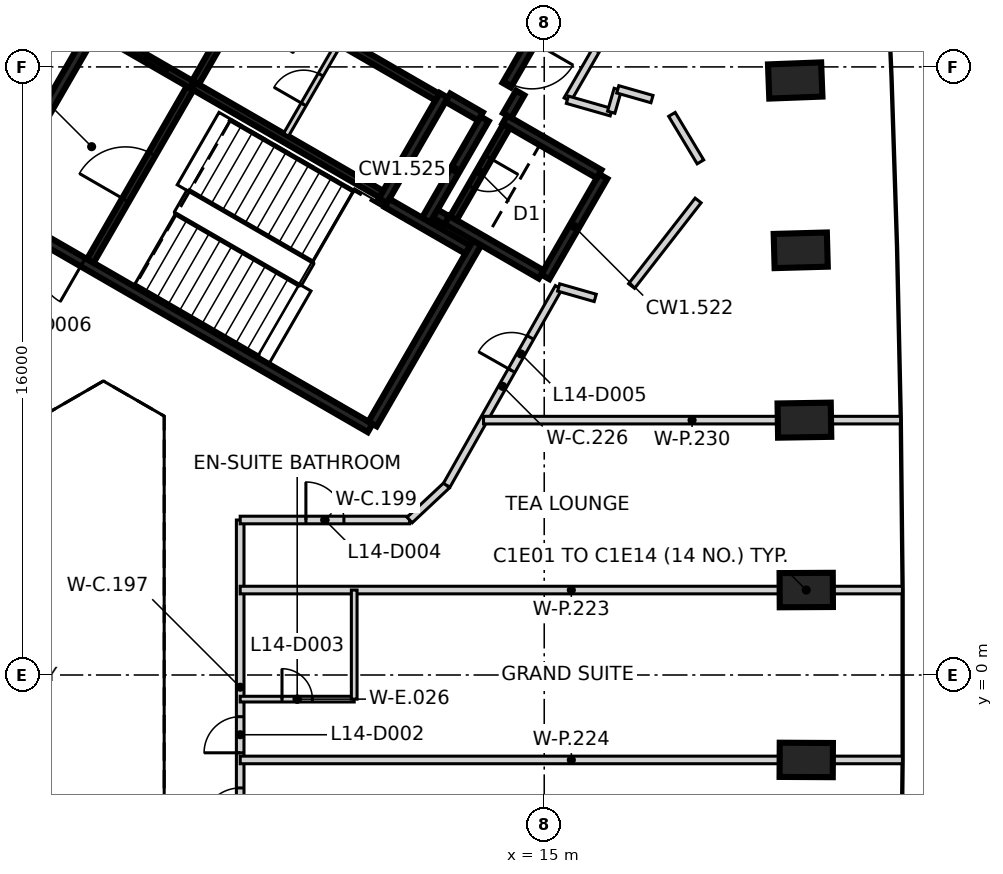
"""IFC4 building model, lengths in metres.
Left out: names, types, materials, properties, quantities, classifications, styles, units other than length and angle.
Written with IfcOpenShell. Run it as: python <this file> out.ifc"""

import sys

from ifc_helpers import new_model, si_unit, direction, frame, frame_2d, origin, origin_2d, place, context, subcontext, project, spatial, rectangle, extrude, element, fill, save


model = new_model("IFC4")
c1 = context("Model", 3, precision=1e-05, world=origin(), true_north=direction((0.0, 1.0)))
c2 = subcontext(c1, "Body", "Model", "MODEL_VIEW")
j1 = project(units=[si_unit("LENGTHUNIT", "METRE"), si_unit("PLANEANGLEUNIT", "RADIAN")], contexts=[c1])
p1 = place(None, origin())
s1 = spatial("IfcSite", under=j1, at=p1, CompositionType="ELEMENT")
p2 = place(p1, origin())
s2 = spatial("IfcBuilding", under=s1, at=p2, CompositionType="ELEMENT")
p3 = place(p2, frame((0.0, 0.0, 63.8)))
s3 = spatial("IfcBuildingStorey", under=s2, at=p3, CompositionType="ELEMENT", Elevation=63.8)
for number, where, z_axis, x_axis in (
    (1, (21.894, -2.235, -0.475), (0.0, 0.0, 1.0), (-1.0, 0.005, 0.0)),
    (2, (21.894, 2.235, -0.475), (0.0, 0.0, 1.0), (1.0, 0.005, 0.0)),
    (3, (21.846, 6.706, -0.475), (0.0, 0.0, 1.0), (1.0, 0.016, 0.0)),
    (4, (21.749, 11.174, -0.475), (0.0, 0.0, 1.0), (1.0, 0.027, 0.0)),
    (5, (21.604, 15.643, -0.475), (0.0, 0.0, 1.0), (0.999, 0.038, 0.0)),
):
    element("IfcColumn", number, at=place(p3, frame(where, z_axis=z_axis, x_axis=x_axis)), inside=s3, PredefinedType="COLUMN", context=c2, shape_type="SweptSolid", body=[
        extrude(rectangle(XDim=1.4, YDim=0.9, at=origin_2d()), origin(), (0.0, 0.0, 1.0), 3.6),
    ])
p4 = place(p3, frame((10.42, 6.498, 0.0), z_axis=(0.0, 0.0, 1.0), x_axis=(-0.866021906294, 0.500006057782, 0.0)))
e6 = element("IfcWall", 6, at=p4, inside=s3, PredefinedType="SHEAR", context=c2, shape_type="SweptSolid", body=[
    extrude(rectangle(XDim=11.55, YDim=0.25, at=frame_2d((5.775, 0.0))), origin(), (0.0, 0.0, 1.0), 3.125),
])
p5 = place(p4, frame((10.025, 0.0, 0.0)))
e7 = element("IfcOpeningElement", 7, at=p5, cuts=e6, PredefinedType="OPENING", context=c2, shape_type="SweptSolid", body=[
    extrude(rectangle(XDim=1.2, YDim=2.1, at=frame_2d((0.6, 1.05))), frame((0.0, 0.135, 0.0), z_axis=(0.0, -1.0, 0.0), x_axis=(1.0, 0.0, 0.0)), (0.0, 0.0, 1.0), 0.27),
])
p6 = place(p4, frame((8.725, 0.0, 0.0)))
e8 = element("IfcOpeningElement", 8, at=p6, cuts=e6, PredefinedType="OPENING", context=c2, shape_type="SweptSolid", body=[
    extrude(rectangle(XDim=1.2, YDim=2.1, at=frame_2d((0.6, 1.05))), frame((0.0, 0.135, 0.0), z_axis=(0.0, -1.0, 0.0), x_axis=(1.0, 0.0, 0.0)), (0.0, 0.0, 1.0), 0.27),
])
p7 = place(p3, frame((0.48, 12.381, 0.0), z_axis=(0.0, 0.0, 1.0), x_axis=(0.49999885962, 0.866026062182, 0.0)))
e9 = element("IfcWall", 9, at=p7, inside=s3, PredefinedType="SHEAR", context=c2, shape_type="SweptSolid", body=[
    extrude(rectangle(XDim=5.225, YDim=0.25, at=frame_2d((2.612, 0.0))), origin(), (0.0, 0.0, 1.0), 3.125),
])
p8 = place(p3, frame((13.238, 11.378, 0.0), z_axis=(0.0, 0.0, 1.0), x_axis=(-0.500008851346, -0.866020293397, 0.0)))
e10 = element("IfcWall", 10, at=p8, inside=s3, PredefinedType="SHEAR", context=c2, shape_type="SweptSolid", body=[
    extrude(rectangle(XDim=5.51, YDim=0.25, at=frame_2d((2.755, 0.0))), origin(), (0.0, 0.0, 1.0), 3.125),
])
p9 = place(p3, frame((12.357, 15.252, 0.0), z_axis=(0.0, 0.0, 1.0), x_axis=(-0.500028443584, -0.866008981251, 0.0)))
e11 = element("IfcWall", 11, at=p9, inside=s3, PredefinedType="SHEAR", context=c2, shape_type="SweptSolid", body=[
    extrude(rectangle(XDim=3.2, YDim=0.25, at=frame_2d((1.6, 0.0))), origin(), (0.0, 0.0, 1.0), 3.125),
])
p10 = place(p3, frame((16.552, 13.119, 0.0), z_axis=(0.0, 0.0, 1.0), x_axis=(-0.499978833458, -0.866037623948, 0.0)))
e12 = element("IfcWall", 12, at=p10, inside=s3, PredefinedType="SHEAR", context=c2, shape_type="SweptSolid", body=[
    extrude(rectangle(XDim=3.05, YDim=0.25, at=frame_2d((1.525, 0.0))), origin(), (0.0, 0.0, 1.0), 3.125),
])
p11 = place(p3, frame((14.918, 10.54, 0.0), z_axis=(0.0, 0.0, 1.0), x_axis=(-0.866063538972, 0.499933942099, 0.0)))
e13 = element("IfcWall", 13, at=p11, inside=s3, PredefinedType="SHEAR", context=c2, shape_type="SweptSolid", body=[
    extrude(rectangle(XDim=2.865, YDim=0.25, at=frame_2d((1.432, 0.0))), origin(), (0.0, 0.0, 1.0), 3.125),
])
p12 = place(p3, frame((13.963, 14.614, 0.0), z_axis=(0.0, 0.0, 1.0), x_axis=(0.866042235819, -0.499970844928, 0.0)))
e14 = element("IfcWall", 14, at=p12, inside=s3, PredefinedType="SHEAR", context=c2, shape_type="SweptSolid", body=[
    extrude(rectangle(XDim=2.865, YDim=0.25, at=frame_2d((1.432, 0.0))), origin(), (0.0, 0.0, 1.0), 3.125),
])
p13 = place(p3, frame((11.888, 11.961, 0.0), z_axis=(0.0, 0.0, 1.0), x_axis=(0.500003324108, 0.866023484601, 0.0)))
e15 = element("IfcWall", 15, at=p13, inside=s3, PredefinedType="SHEAR", context=c2, shape_type="SweptSolid", body=[
    extrude(rectangle(XDim=3.085, YDim=0.25, at=frame_2d((1.542, 0.0))), origin(), (0.0, 0.0, 1.0), 3.125),
])
p14 = place(p3, frame((10.865, 12.418, 0.0), z_axis=(0.0, 0.0, 1.0), x_axis=(0.866026229868, -0.499998569178, 0.0)))
e16 = element("IfcWall", 16, at=p14, inside=s3, PredefinedType="SHEAR", context=c2, shape_type="SweptSolid", body=[
    extrude(rectangle(XDim=2.449, YDim=0.25, at=frame_2d((1.225, 0.0))), origin(), (0.0, 0.0, 1.0), 3.125),
])
p15 = place(p3, frame((14.945, 17.135, 0.0), z_axis=(0.0, 0.0, 1.0), x_axis=(-0.499983108224, -0.866035156036, 0.0)))
e17 = element("IfcWall", 17, at=p15, inside=s3, PredefinedType="SHEAR", context=c2, shape_type="SweptSolid", body=[
    extrude(rectangle(XDim=1.865, YDim=0.25, at=frame_2d((0.932, 0.0))), origin(), (0.0, 0.0, 1.0), 3.125),
])
p16 = place(p15, frame((0.535, 0.0, 0.0)))
e18 = element("IfcOpeningElement", 18, at=p16, cuts=e17, PredefinedType="OPENING", context=c2, shape_type="SweptSolid", body=[
    extrude(rectangle(XDim=1.25, YDim=2.1, at=frame_2d((0.625, 1.05))), frame((0.0, 0.135, 0.0), z_axis=(0.0, -1.0, 0.0), x_axis=(1.0, 0.0, 0.0)), (0.0, 0.0, 1.0), 0.27),
])
p17 = place(p3, frame((13.322, 14.695, 0.0), z_axis=(0.0, 0.0, 1.0), x_axis=(-0.866017078145, 0.500014420154, 0.0)))
e19 = element("IfcWall", 19, at=p17, inside=s3, PredefinedType="SHEAR", context=c2, shape_type="SweptSolid", body=[
    extrude(rectangle(XDim=0.989, YDim=0.25, at=frame_2d((0.495, 0.0))), origin(), (0.0, 0.0, 1.0), 3.125),
])
p18 = place(p3, frame((14.368, 15.315, 0.0), z_axis=(0.0, 0.0, 1.0), x_axis=(-0.499897359611, -0.866084655132, 0.0)))
e20 = element("IfcWall", 20, at=p18, inside=s3, PredefinedType="SHEAR", context=c2, shape_type="SweptSolid", body=[
    extrude(rectangle(XDim=0.685, YDim=0.25, at=frame_2d((0.342, 0.0))), origin(), (0.0, 0.0, 1.0), 3.125),
])
p19 = place(p3, frame((12.433, 11.964, 0.0), z_axis=(0.0, 0.0, 1.0), x_axis=(-0.866055875208, 0.499947218231, 0.0)))
e21 = element("IfcWall", 21, at=p19, inside=s3, PredefinedType="SHEAR", context=c2, shape_type="SweptSolid", body=[
    extrude(rectangle(XDim=0.345, YDim=0.25, at=frame_2d((0.172, 0.0))), origin(), (0.0, 0.0, 1.0), 3.125),
])
p20 = place(p3, frame((5.775, 15.502, 0.0), z_axis=(0.0, 0.0, 1.0), x_axis=(0.866020080793, -0.500009219579, 0.0)))
e22 = element("IfcWall", 22, at=p20, inside=s3, PredefinedType="SHEAR", context=c2, shape_type="SweptSolid", body=[
    extrude(rectangle(XDim=5.699, YDim=0.2, at=frame_2d((2.85, 0.0))), origin(), (0.0, 0.0, 1.0), 3.125),
])
p21 = place(p3, frame((12.185, 15.207, 0.0), z_axis=(0.0, 0.0, 1.0), x_axis=(-0.866020080793, 0.500009219579, 0.0)))
e23 = element("IfcWall", 23, at=p21, inside=s3, PredefinedType="SHEAR", context=c2, shape_type="SweptSolid", body=[
    extrude(rectangle(XDim=5.699, YDim=0.2, at=frame_2d((2.85, 0.0))), origin(), (0.0, 0.0, 1.0), 3.125),
])
p22 = place(p21, frame((3.874, 0.0, 0.0)))
e24 = element("IfcOpeningElement", 24, at=p22, cuts=e23, PredefinedType="OPENING", context=c2, shape_type="SweptSolid", body=[
    extrude(rectangle(XDim=0.9, YDim=2.1, at=frame_2d((0.45, 1.05))), frame((0.0, 0.11, 0.0), z_axis=(0.0, -1.0, 0.0), x_axis=(1.0, 0.0, 0.0)), (0.0, 0.0, 1.0), 0.22),
])
p23 = place(p3, frame((3.057, 10.895, 0.0), z_axis=(0.0, 0.0, 1.0), x_axis=(0.499989418164, 0.866031513124, 0.0)))
e25 = element("IfcWall", 25, at=p23, inside=s3, PredefinedType="SHEAR", context=c2, shape_type="SweptSolid", body=[
    extrude(rectangle(XDim=5.251, YDim=0.2, at=frame_2d((2.625, 0.0))), origin(), (0.0, 0.0, 1.0), 3.125),
])
p24 = place(p23, frame((1.849, 0.0, 0.0)))
e26 = element("IfcOpeningElement", 26, at=p24, cuts=e25, PredefinedType="OPENING", context=c2, shape_type="SweptSolid", body=[
    extrude(rectangle(XDim=1.4, YDim=2.1, at=frame_2d((0.7, 1.05))), frame((0.0, 0.11, 0.0), z_axis=(0.0, -1.0, 0.0), x_axis=(1.0, 0.0, 0.0)), (0.0, 0.0, 1.0), 0.22),
])
p25 = place(p3, frame((14.008, 14.442, 0.0), z_axis=(0.0, 0.0, 1.0), x_axis=(-0.499986818241, -0.866033014143, 0.0)))
e27 = element("IfcWall", 27, at=p25, inside=s3, PredefinedType="SHEAR", context=c2, shape_type="SweptSolid", body=[
    extrude(rectangle(XDim=2.798, YDim=0.2, at=frame_2d((1.399, 0.0))), origin(), (0.0, 0.0, 1.0), 3.125),
])
p26 = place(p25, frame((0.949, 0.0, 0.0)))
e28 = element("IfcOpeningElement", 28, at=p26, cuts=e27, PredefinedType="OPENING", context=c2, shape_type="SweptSolid", body=[
    extrude(rectangle(XDim=0.9, YDim=2.1, at=frame_2d((0.45, 1.05))), frame((0.0, 0.11, 0.0), z_axis=(0.0, -1.0, 0.0), x_axis=(1.0, 0.0, 0.0)), (0.0, 0.0, 1.0), 0.22),
])
p27 = place(p3, frame((7.199, 17.97, 0.0), z_axis=(0.0, 0.0, 1.0), x_axis=(-0.499968400327, -0.866043647095, 0.0)))
e29 = element("IfcWall", 29, at=p27, inside=s3, PredefinedType="SHEAR", context=c2, shape_type="SweptSolid", body=[
    extrude(rectangle(XDim=2.75, YDim=0.2, at=frame_2d((1.375, 0.0))), origin(), (0.0, 0.0, 1.0), 3.125),
])
p28 = place(p3, frame((5.725, 15.531, 0.0), z_axis=(0.0, 0.0, 1.0), x_axis=(-0.866037306777, 0.499979382845, 0.0)))
e30 = element("IfcWall", 30, at=p28, inside=s3, PredefinedType="SHEAR", context=c2, shape_type="SweptSolid", body=[
    extrude(rectangle(XDim=2.742, YDim=0.2, at=frame_2d((1.371, 0.0))), origin(), (0.0, 0.0, 1.0), 3.125),
])
p29 = place(p28, frame((0.743, 0.0, 0.0)))
e31 = element("IfcOpeningElement", 31, at=p29, cuts=e30, PredefinedType="OPENING", context=c2, shape_type="SweptSolid", body=[
    extrude(rectangle(XDim=1.3, YDim=2.1, at=frame_2d((0.65, 1.05))), frame((0.0, 0.11, 0.0), z_axis=(0.0, -1.0, 0.0), x_axis=(1.0, 0.0, 0.0)), (0.0, 0.0, 1.0), 0.22),
])
p30 = place(p3, frame((8.207, 14.214, 0.0), z_axis=(0.0, 0.0, 1.0), x_axis=(0.499922376475, 0.866070215109, 0.0)))
e32 = element("IfcWall", 32, at=p30, inside=s3, PredefinedType="PARTITIONING", context=c2, shape_type="SweptSolid", body=[
    extrude(rectangle(XDim=2.749, YDim=0.15, at=frame_2d((1.374, 0.0))), origin(), (0.0, 0.0, 1.0), 3.125),
])
p31 = place(p30, frame((0.924, 0.0, 0.0)))
e33 = element("IfcOpeningElement", 33, at=p31, cuts=e32, PredefinedType="OPENING", context=c2, shape_type="SweptSolid", body=[
    extrude(rectangle(XDim=0.9, YDim=2.1, at=frame_2d((0.45, 1.05))), frame((0.0, 0.085, 0.0), z_axis=(0.0, -1.0, 0.0), x_axis=(1.0, 0.0, 0.0)), (0.0, 0.0, 1.0), 0.17),
])
p32 = place(p3, frame((7.0, -4.721, 0.0), z_axis=(0.0, 0.0, 1.0), x_axis=(0.0, 1.0, 0.0)))
e34 = element("IfcWall", 34, at=p32, inside=s3, PredefinedType="PARTITIONING", context=c2, shape_type="SweptSolid", body=[
    extrude(rectangle(XDim=8.799, YDim=0.2, at=frame_2d((4.399, 0.0))), origin(), (0.0, 0.0, 1.0), 3.125),
])
p33 = place(p32, frame((0.749, 0.0, 0.0)))
e35 = element("IfcOpeningElement", 35, at=p33, cuts=e34, PredefinedType="OPENING", context=c2, shape_type="SweptSolid", body=[
    extrude(rectangle(XDim=1.0, YDim=2.1, at=frame_2d((0.5, 1.05))), frame((0.0, 0.11, 0.0), z_axis=(0.0, -1.0, 0.0), x_axis=(1.0, 0.0, 0.0)), (0.0, 0.0, 1.0), 0.22),
])
p34 = place(p32, frame((2.674, 0.0, 0.0)))
e36 = element("IfcOpeningElement", 36, at=p34, cuts=e34, PredefinedType="OPENING", context=c2, shape_type="SweptSolid", body=[
    extrude(rectangle(XDim=0.95, YDim=2.1, at=frame_2d((0.475, 1.05))), frame((0.0, 0.11, 0.0), z_axis=(0.0, -1.0, 0.0), x_axis=(1.0, 0.0, 0.0)), (0.0, 0.0, 1.0), 0.22),
])
p35 = place(p3, frame((7.0, 4.078, 0.0), z_axis=(0.0, 0.0, 1.0), x_axis=(1.0, 0.0, 0.0)))
e37 = element("IfcWall", 37, at=p35, inside=s3, PredefinedType="PARTITIONING", context=c2, shape_type="SweptSolid", body=[
    extrude(rectangle(XDim=4.458, YDim=0.2, at=frame_2d((2.229, 0.0))), origin(), (0.0, 0.0, 1.0), 3.125),
])
p36 = place(p35, frame((1.729, 0.0, 0.0)))
e38 = element("IfcOpeningElement", 38, at=p36, cuts=e37, PredefinedType="OPENING", context=c2, shape_type="SweptSolid", body=[
    extrude(rectangle(XDim=1.0, YDim=2.1, at=frame_2d((0.5, 1.05))), frame((0.0, 0.11, 0.0), z_axis=(0.0, -1.0, 0.0), x_axis=(1.0, 0.0, 0.0)), (0.0, 0.0, 1.0), 0.22),
])
p37 = place(p3, frame((11.458, 4.078, 0.0), z_axis=(0.0, 0.0, 1.0), x_axis=(0.729936032318, 0.683515463412, 0.0)))
e39 = element("IfcWall", 39, at=p37, inside=s3, PredefinedType="PARTITIONING", context=c2, shape_type="SweptSolid", body=[
    extrude(rectangle(XDim=1.336, YDim=0.2, at=frame_2d((0.668, 0.0))), origin(), (0.0, 0.0, 1.0), 3.125),
])
p38 = place(p3, frame((12.433, 4.992, 0.0), z_axis=(0.0, 0.0, 1.0), x_axis=(0.492583054982, 0.870265438786, 0.0)))
e40 = element("IfcWall", 40, at=p38, inside=s3, PredefinedType="PARTITIONING", context=c2, shape_type="SweptSolid", body=[
    extrude(rectangle(XDim=5.981, YDim=0.2, at=frame_2d((2.991, 0.0))), origin(), (0.0, 0.0, 1.0), 3.125),
])
p39 = place(p38, frame((3.469, 0.0, 0.0)))
e41 = element("IfcOpeningElement", 41, at=p39, cuts=e40, PredefinedType="OPENING", context=c2, shape_type="SweptSolid", body=[
    extrude(rectangle(XDim=1.0, YDim=2.1, at=frame_2d((0.5, 1.05))), frame((0.0, 0.11, 0.0), z_axis=(0.0, -1.0, 0.0), x_axis=(1.0, 0.0, 0.0)), (0.0, 0.0, 1.0), 0.22),
])
p40 = place(p3, frame((15.156, 17.13, 0.0), z_axis=(0.0, 0.0, 1.0), x_axis=(0.865755062894, -0.500467952093, 0.0)))
e42 = element("IfcWall", 42, at=p40, inside=s3, PredefinedType="PARTITIONING", context=c2, shape_type="SweptSolid", body=[
    extrude(rectangle(XDim=1.389, YDim=0.2, at=frame_2d((0.694, 0.0))), origin(), (0.0, 0.0, 1.0), 3.125),
])
p41 = place(p3, frame((15.38, 10.197, 0.0), z_axis=(0.0, 0.0, 1.0), x_axis=(0.961523947641, -0.274721127897, 0.0)))
e43 = element("IfcWall", 43, at=p41, inside=s3, PredefinedType="PARTITIONING", context=c2, shape_type="SweptSolid", body=[
    extrude(rectangle(XDim=1.001, YDim=0.2, at=frame_2d((0.5, 0.0))), origin(), (0.0, 0.0, 1.0), 3.125),
])
p42 = place(p3, frame((15.609, 15.136, 0.0), z_axis=(0.0, 0.0, 1.0), x_axis=(0.499501622561, 0.866312950993, 0.0)))
e44 = element("IfcWall", 44, at=p42, inside=s3, PredefinedType="PARTITIONING", context=c2, shape_type="SweptSolid", body=[
    extrude(rectangle(XDim=1.5, YDim=0.2, at=frame_2d((0.75, 0.0))), origin(), (0.0, 0.0, 1.0), 3.125),
])
p43 = place(p3, frame((15.609, 15.136, 0.0), z_axis=(0.0, 0.0, 1.0), x_axis=(0.961662011825, -0.274237442763, 0.0)))
e45 = element("IfcWall", 45, at=p43, inside=s3, PredefinedType="PARTITIONING", context=c2, shape_type="SweptSolid", body=[
    extrude(rectangle(XDim=1.2, YDim=0.2, at=frame_2d((0.6, 0.0))), origin(), (0.0, 0.0, 1.0), 3.125),
])
p44 = place(p3, frame((16.763, 14.807, 0.0), z_axis=(0.0, 0.0, 1.0), x_axis=(0.274464026122, 0.961597368115, 0.0)))
e46 = element("IfcWall", 46, at=p44, inside=s3, PredefinedType="PARTITIONING", context=c2, shape_type="SweptSolid", body=[
    extrude(rectangle(XDim=0.627, YDim=0.2, at=frame_2d((0.313, 0.0))), origin(), (0.0, 0.0, 1.0), 3.125),
])
p45 = place(p3, frame((16.935, 15.41, 0.0), z_axis=(0.0, 0.0, 1.0), x_axis=(0.961602664273, -0.274445470107, 0.0)))
e47 = element("IfcWall", 47, at=p45, inside=s3, PredefinedType="PARTITIONING", context=c2, shape_type="SweptSolid", body=[
    extrude(rectangle(XDim=0.936, YDim=0.2, at=frame_2d((0.468, 0.0))), origin(), (0.0, 0.0, 1.0), 3.125),
])
p46 = place(p3, frame((17.299, 10.235, 0.0), z_axis=(0.0, 0.0, 1.0), x_axis=(0.61377461522, 0.789481299153, 0.0)))
e48 = element("IfcWall", 48, at=p46, inside=s3, PredefinedType="PARTITIONING", context=c2, shape_type="SweptSolid", body=[
    extrude(rectangle(XDim=2.851, YDim=0.2, at=frame_2d((1.426, 0.0))), origin(), (0.0, 0.0, 1.0), 3.125),
])
p47 = place(p3, frame((18.36, 14.751, 0.0), z_axis=(0.0, 0.0, 1.0), x_axis=(0.514495755428, -0.857492925713, 0.0)))
e49 = element("IfcWall", 49, at=p47, inside=s3, PredefinedType="PARTITIONING", context=c2, shape_type="SweptSolid", body=[
    extrude(rectangle(XDim=1.458, YDim=0.2, at=frame_2d((0.729, 0.0))), origin(), (0.0, 0.0, 1.0), 3.125),
])
p48 = place(p3, frame((7.0, 2.235, 0.0), z_axis=(0.0, 0.0, 1.0), x_axis=(1.0, 0.0, 0.0)))
e50 = element("IfcWall", 50, at=p48, inside=s3, PredefinedType="PARTITIONING", context=c2, shape_type="SweptSolid", body=[
    extrude(rectangle(XDim=17.425, YDim=0.2, at=frame_2d((8.712, 0.0))), origin(), (0.0, 0.0, 1.0), 3.125),
])
p49 = place(p3, frame((7.001, -2.235, 0.0), z_axis=(0.0, 0.0, 1.0), x_axis=(1.0, 0.0, 0.0)))
e51 = element("IfcWall", 51, at=p49, inside=s3, PredefinedType="PARTITIONING", context=c2, shape_type="SweptSolid", body=[
    extrude(rectangle(XDim=17.424, YDim=0.2, at=frame_2d((8.712, 0.0))), origin(), (0.0, 0.0, 1.0), 3.125),
])
p50 = place(p3, frame((13.403, 6.706, 0.0), z_axis=(0.0, 0.0, 1.0), x_axis=(1.0, 0.0, 0.0)))
e52 = element("IfcWall", 52, at=p50, inside=s3, PredefinedType="PARTITIONING", context=c2, shape_type="SweptSolid", body=[
    extrude(rectangle(XDim=10.974, YDim=0.2, at=frame_2d((5.487, 0.0))), origin(), (0.0, 0.0, 1.0), 3.125),
])
p51 = place(p3, frame((7.0, -0.635, 0.0), z_axis=(0.0, 0.0, 1.0), x_axis=(1.0, 0.0, 0.0)))
e53 = element("IfcWall", 53, at=p51, inside=s3, PredefinedType="PARTITIONING", context=c2, shape_type="SweptSolid", body=[
    extrude(rectangle(XDim=3.0, YDim=0.15, at=frame_2d((1.5, 0.0))), origin(), (0.0, 0.0, 1.0), 3.125),
])
p52 = place(p51, frame((1.1, 0.0, 0.0)))
e54 = element("IfcOpeningElement", 54, at=p52, cuts=e53, PredefinedType="OPENING", context=c2, shape_type="SweptSolid", body=[
    extrude(rectangle(XDim=0.8, YDim=2.1, at=frame_2d((0.4, 1.05))), frame((0.0, 0.085, 0.0), z_axis=(0.0, -1.0, 0.0), x_axis=(1.0, 0.0, 0.0)), (0.0, 0.0, 1.0), 0.17),
])
p53 = place(p3, frame((10.0, -0.635, 0.0), z_axis=(0.0, 0.0, 1.0), x_axis=(0.0, 1.0, 0.0)))
e55 = element("IfcWall", 55, at=p53, inside=s3, PredefinedType="PARTITIONING", context=c2, shape_type="SweptSolid", body=[
    extrude(rectangle(XDim=2.87, YDim=0.15, at=frame_2d((1.435, 0.0))), origin(), (0.0, 0.0, 1.0), 3.125),
])
p54 = place(p29, origin())
e56 = element("IfcDoor", 56, at=p54, inside=s3, OperationType="SLIDING_TO_RIGHT", PredefinedType="DOOR", context=c2, shape_type="SweptSolid", body=[
    extrude(rectangle(XDim=1.3, YDim=2.1, at=frame_2d((0.65, 1.05))), frame((0.0, 0.025, 0.0), z_axis=(0.0, -1.0, 0.0), x_axis=(1.0, 0.0, 0.0)), (0.0, 0.0, 1.0), 0.05),
])
fill(e31, e56)
p55 = place(p16, origin())
e57 = element("IfcDoor", 57, at=p55, inside=s3, OperationType="SINGLE_SWING_LEFT", PredefinedType="DOOR", context=c2, shape_type="SweptSolid", body=[
    extrude(rectangle(XDim=1.25, YDim=2.1, at=frame_2d((0.625, 1.05))), frame((0.0, 0.025, 0.0), z_axis=(0.0, -1.0, 0.0), x_axis=(1.0, 0.0, 0.0)), (0.0, 0.0, 1.0), 0.05),
])
fill(e18, e57)
p56 = place(p6, origin())
e58 = element("IfcDoor", 58, at=p56, inside=s3, OperationType="SINGLE_SWING_RIGHT", PredefinedType="DOOR", context=c2, shape_type="SweptSolid", body=[
    extrude(rectangle(XDim=1.2, YDim=2.1, at=frame_2d((0.6, 1.05))), frame((0.0, 0.025, 0.0), z_axis=(0.0, -1.0, 0.0), x_axis=(1.0, 0.0, 0.0)), (0.0, 0.0, 1.0), 0.05),
])
fill(e8, e58)
p57 = place(p24, origin())
e59 = element("IfcDoor", 59, at=p57, inside=s3, OperationType="SINGLE_SWING_RIGHT", PredefinedType="DOOR", context=c2, shape_type="SweptSolid", body=[
    extrude(rectangle(XDim=1.4, YDim=2.1, at=frame_2d((0.7, 1.05))), frame((0.0, 0.025, 0.0), z_axis=(0.0, -1.0, 0.0), x_axis=(1.0, 0.0, 0.0)), (0.0, 0.0, 1.0), 0.05),
])
fill(e26, e59)
p58 = place(p26, origin())
e60 = element("IfcDoor", 60, at=p58, inside=s3, OperationType="SINGLE_SWING_RIGHT", PredefinedType="DOOR", context=c2, shape_type="SweptSolid", body=[
    extrude(rectangle(XDim=0.9, YDim=2.1, at=frame_2d((0.45, 1.05))), frame((0.0, 0.025, 0.0), z_axis=(0.0, -1.0, 0.0), x_axis=(1.0, 0.0, 0.0)), (0.0, 0.0, 1.0), 0.05),
])
fill(e28, e60)
p59 = place(p31, origin())
e61 = element("IfcDoor", 61, at=p59, inside=s3, OperationType="SINGLE_SWING_LEFT", PredefinedType="DOOR", context=c2, shape_type="SweptSolid", body=[
    extrude(rectangle(XDim=0.9, YDim=2.1, at=frame_2d((0.45, 1.05))), frame((0.0, 0.025, 0.0), z_axis=(0.0, -1.0, 0.0), x_axis=(1.0, 0.0, 0.0)), (0.0, 0.0, 1.0), 0.05),
])
fill(e33, e61)
p60 = place(p33, frame((1.0, 0.0, 0.0), z_axis=(0.0, 0.0, 1.0), x_axis=(-1.0, 0.0, 0.0)))
e62 = element("IfcDoor", 62, at=p60, inside=s3, OperationType="SINGLE_SWING_LEFT", PredefinedType="DOOR", context=c2, shape_type="SweptSolid", body=[
    extrude(rectangle(XDim=1.0, YDim=2.1, at=frame_2d((0.5, 1.05))), frame((0.0, 0.025, 0.0), z_axis=(0.0, -1.0, 0.0), x_axis=(1.0, 0.0, 0.0)), (0.0, 0.0, 1.0), 0.05),
])
fill(e35, e62)
p61 = place(p34, frame((0.95, 0.0, 0.0), z_axis=(0.0, 0.0, 1.0), x_axis=(-1.0, 0.0, 0.0)))
e63 = element("IfcDoor", 63, at=p61, inside=s3, OperationType="SINGLE_SWING_LEFT", PredefinedType="DOOR", context=c2, shape_type="SweptSolid", body=[
    extrude(rectangle(XDim=0.95, YDim=2.1, at=frame_2d((0.475, 1.05))), frame((0.0, 0.025, 0.0), z_axis=(0.0, -1.0, 0.0), x_axis=(1.0, 0.0, 0.0)), (0.0, 0.0, 1.0), 0.05),
])
fill(e36, e63)
p62 = place(p52, origin())
e64 = element("IfcDoor", 64, at=p62, inside=s3, OperationType="SINGLE_SWING_LEFT", PredefinedType="DOOR", context=c2, shape_type="SweptSolid", body=[
    extrude(rectangle(XDim=0.8, YDim=2.1, at=frame_2d((0.4, 1.05))), frame((0.0, 0.025, 0.0), z_axis=(0.0, -1.0, 0.0), x_axis=(1.0, 0.0, 0.0)), (0.0, 0.0, 1.0), 0.05),
])
fill(e54, e64)
p63 = place(p36, origin())
e65 = element("IfcDoor", 65, at=p63, inside=s3, OperationType="SINGLE_SWING_LEFT", PredefinedType="DOOR", context=c2, shape_type="SweptSolid", body=[
    extrude(rectangle(XDim=1.0, YDim=2.1, at=frame_2d((0.5, 1.05))), frame((0.0, 0.025, 0.0), z_axis=(0.0, -1.0, 0.0), x_axis=(1.0, 0.0, 0.0)), (0.0, 0.0, 1.0), 0.05),
])
fill(e38, e65)
p64 = place(p39, origin())
e66 = element("IfcDoor", 66, at=p64, inside=s3, OperationType="SINGLE_SWING_LEFT", PredefinedType="DOOR", context=c2, shape_type="SweptSolid", body=[
    extrude(rectangle(XDim=1.0, YDim=2.1, at=frame_2d((0.5, 1.05))), frame((0.0, 0.025, 0.0), z_axis=(0.0, -1.0, 0.0), x_axis=(1.0, 0.0, 0.0)), (0.0, 0.0, 1.0), 0.05),
])
fill(e41, e66)
save(model, sys.argv[1])
